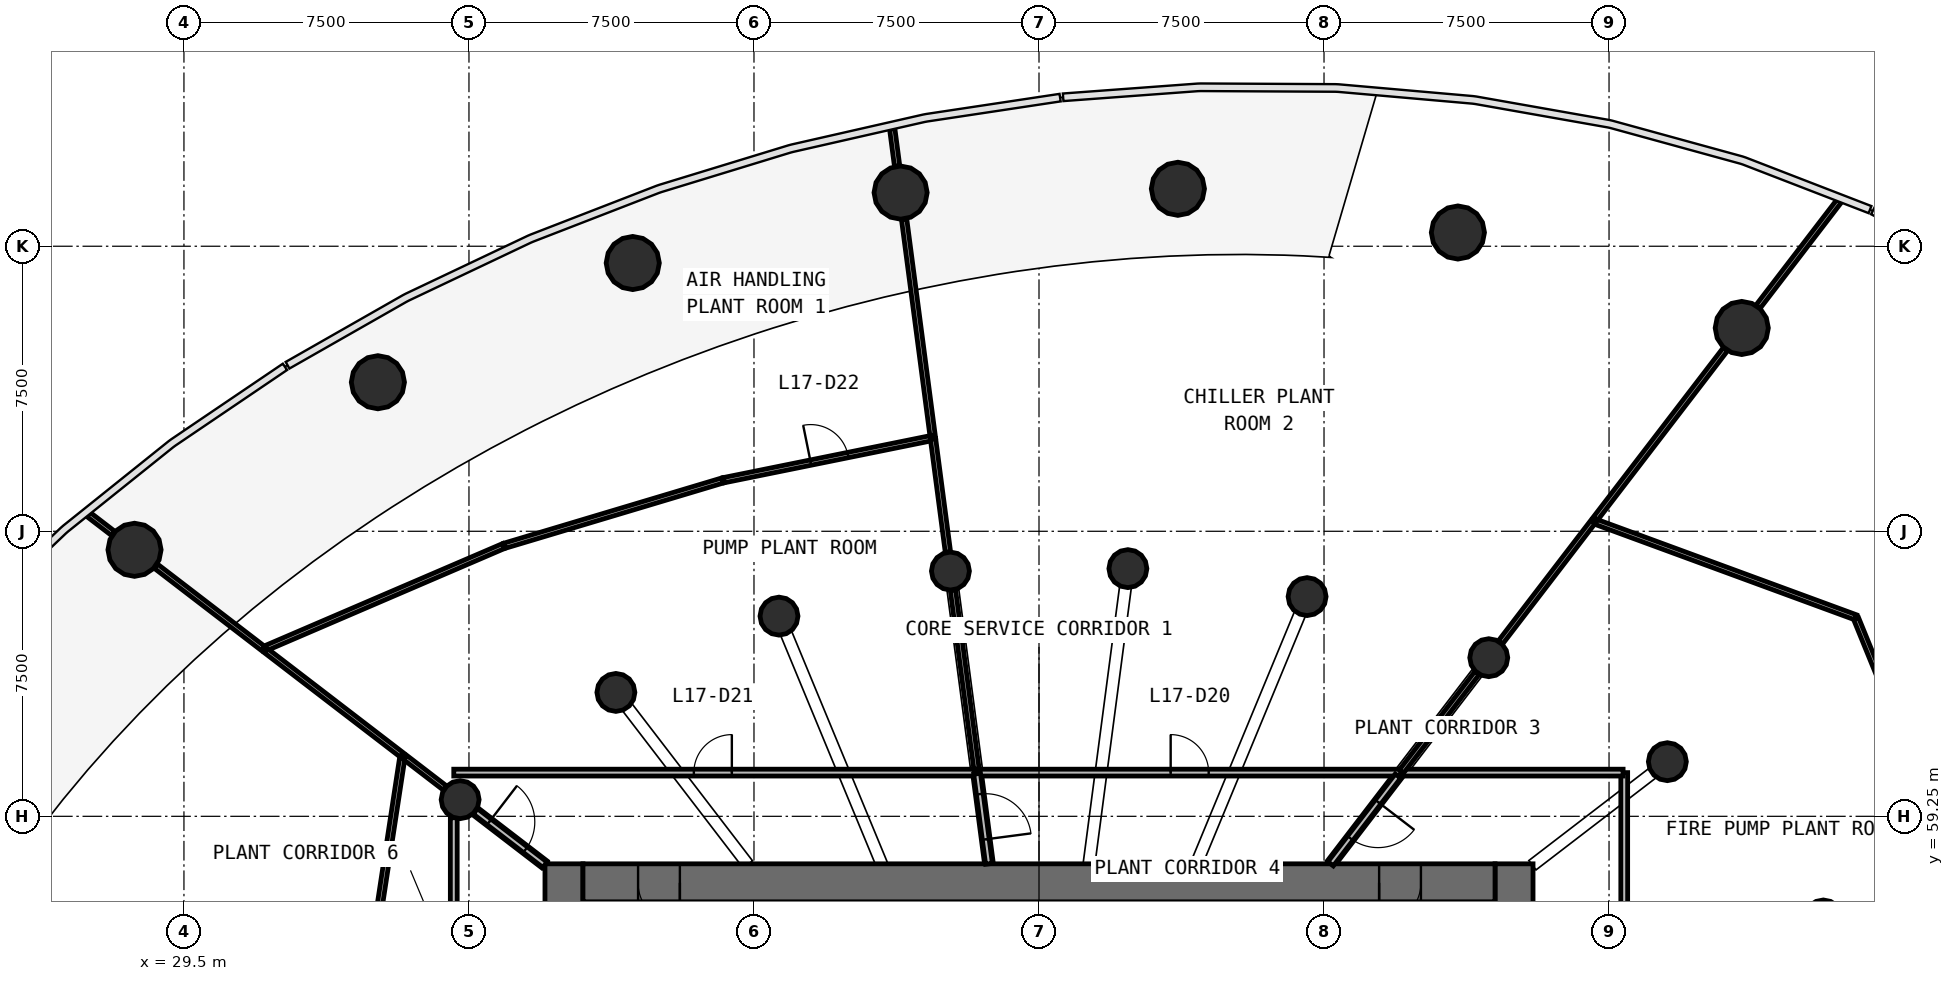
"""IFC4 building model, lengths in metres.
Left out: names, types, materials, properties, quantities, classifications, styles, units other than length and angle.
Written with IfcOpenShell. Run it as: python <this file> out.ifc"""

import sys

from ifc_helpers import new_model, si_unit, direction, frame, frame_2d, origin, origin_2d, place, context, subcontext, project, spatial, rectangle, circle, extrude, source, transform, mapped, element, fill, save


model = new_model("IFC4")
c1 = context("Model", 3, precision=1e-05, world=origin(), true_north=direction((0.0, 1.0)))
c2 = subcontext(c1, "Body", "Model", "MODEL_VIEW")
j1 = project(units=[si_unit("LENGTHUNIT", "METRE"), si_unit("PLANEANGLEUNIT", "RADIAN")], contexts=[c1])
p1 = place(None, origin())
s1 = spatial("IfcSite", under=j1, at=p1, CompositionType="ELEMENT")
p2 = place(p1, origin())
s2 = spatial("IfcBuilding", under=s1, at=p2, CompositionType="ELEMENT")
p3 = place(p2, frame((0.0, 0.0, 75.4)))
s3 = spatial("IfcBuildingStorey", under=s2, at=p3, CompositionType="ELEMENT", Elevation=75.4)
p4 = place(p3, frame((64.5, 38.0, 0.0), z_axis=(0.0, 0.0, 1.0), x_axis=(0.0, 1.0, 0.0)))
e1 = element("IfcWall", 1, at=p4, inside=s3, PredefinedType="SHEAR", context=c2, shape_type="SweptSolid", body=[
    extrude(rectangle(XDim=20.0, YDim=1.0, at=frame_2d((10.0, 0.0))), origin(), (0.0, 0.0, 1.0), 4.4),
])
p5 = place(p4, frame((9.1, 0.0, 0.0)))
e2 = element("IfcOpeningElement", 2, at=p5, cuts=e1, PredefinedType="OPENING", context=c2, shape_type="SweptSolid", body=[
    extrude(rectangle(XDim=1.8, YDim=2.1, at=frame_2d((0.9, 1.05))), frame((0.0, 0.51, 0.0), z_axis=(0.0, -1.0, 0.0), x_axis=(1.0, 0.0, 0.0)), (0.0, 0.0, 1.0), 1.02),
])
p6 = place(p3, frame((39.5, 58.0, 0.0), z_axis=(0.0, 0.0, 1.0), x_axis=(0.0, -1.0, 0.0)))
e3 = element("IfcWall", 3, at=p6, inside=s3, PredefinedType="SHEAR", context=c2, shape_type="SweptSolid", body=[
    extrude(rectangle(XDim=20.0, YDim=1.0, at=frame_2d((10.0, 0.0))), origin(), (0.0, 0.0, 1.0), 4.4),
])
p7 = place(p6, frame((9.1, 0.0, 0.0)))
e4 = element("IfcOpeningElement", 4, at=p7, cuts=e3, PredefinedType="OPENING", context=c2, shape_type="SweptSolid", body=[
    extrude(rectangle(XDim=1.8, YDim=2.1, at=frame_2d((0.9, 1.05))), frame((0.0, 0.51, 0.0), z_axis=(0.0, -1.0, 0.0), x_axis=(1.0, 0.0, 0.0)), (0.0, 0.0, 1.0), 1.02),
])
p8 = place(p3, frame((64.0, 57.5, 0.0), z_axis=(0.0, 0.0, 1.0), x_axis=(-1.0, 0.0, 0.0)))
e5 = element("IfcWall", 5, at=p8, inside=s3, PredefinedType="SHEAR", context=c2, shape_type="SweptSolid", body=[
    extrude(rectangle(XDim=24.0, YDim=1.0, at=frame_2d((12.0, 0.0))), origin(), (0.0, 0.0, 1.0), 4.4),
])
p9 = place(p8, frame((21.45, 0.0, 0.0)))
e6 = element("IfcOpeningElement", 6, at=p9, cuts=e5, PredefinedType="OPENING", context=c2, shape_type="SweptSolid", body=[
    extrude(rectangle(XDim=1.1, YDim=2.1, at=frame_2d((0.55, 1.05))), frame((0.0, 0.51, 0.0), z_axis=(0.0, -1.0, 0.0), x_axis=(1.0, 0.0, 0.0)), (0.0, 0.0, 1.0), 1.02),
])
p10 = place(p8, frame((1.95, 0.0, 0.0)))
e7 = element("IfcOpeningElement", 7, at=p10, cuts=e5, PredefinedType="OPENING", context=c2, shape_type="SweptSolid", body=[
    extrude(rectangle(XDim=1.1, YDim=2.1, at=frame_2d((0.55, 1.05))), frame((0.0, 0.51, 0.0), z_axis=(0.0, -1.0, 0.0), x_axis=(1.0, 0.0, 0.0)), (0.0, 0.0, 1.0), 1.02),
])
m1 = source(origin(), c2, "Body", "SweptSolid", [
    extrude(circle(Radius=0.7, at=origin_2d()), origin(), (0.0, 0.0, 1.0), 4.0),
])
for number, where, z_axis, x_axis in (
    (8, (70.492, 72.1, 0.0), (0.0, 0.0, 1.0), (1.0, 0.0, 0.0)),
    (9, (63.023, 74.611, 0.0), (0.0, 0.0, 1.0), (1.0, 0.0, 0.0)),
    (10, (55.655, 75.761, 0.0), (0.0, 0.0, 1.0), (1.0, 0.0, 0.0)),
    (11, (48.358, 75.661, 0.0), (0.0, 0.0, 1.0), (1.0, 0.0, 0.0)),
    (12, (41.31, 73.809, 0.0), (0.0, 0.0, 1.0), (1.0, 0.0, 0.0)),
    (13, (34.604, 70.672, 0.0), (0.0, 0.0, 1.0), (1.0, 0.0, 0.0)),
    (14, (28.199, 66.263, 0.0), (0.0, 0.0, 1.0), (1.0, 0.0, 0.0)),
):
    element("IfcColumn", number, at=place(p3, frame(where, z_axis=z_axis, x_axis=x_axis)), inside=s3, PredefinedType="COLUMN", context=c2, shape_type="MappedRepresentation", body=[
        mapped(m1, transform((0.0, 0.0, 0.0), scale=1.0)),
    ])
m2 = source(origin(), c2, "Body", "SweptSolid", [
    extrude(circle(Radius=0.5, at=origin_2d()), origin(), (0.0, 0.0, 1.0), 4.4),
])
for number, where, z_axis, x_axis in (
    (15, (72.639, 56.549, 0.0), (0.0, 0.0, 1.0), (1.0, 0.0, 0.0)),
    (16, (68.535, 60.688, 0.0), (0.0, 0.0, 1.0), (1.0, 0.0, 0.0)),
    (17, (63.835, 63.424, 0.0), (0.0, 0.0, 1.0), (1.0, 0.0, 0.0)),
    (18, (59.055, 65.031, 0.0), (0.0, 0.0, 1.0), (1.0, 0.0, 0.0)),
    (19, (54.339, 65.767, 0.0), (0.0, 0.0, 1.0), (1.0, 0.0, 0.0)),
    (20, (49.669, 65.703, 0.0), (0.0, 0.0, 1.0), (1.0, 0.0, 0.0)),
    (21, (45.158, 64.518, 0.0), (0.0, 0.0, 1.0), (1.0, 0.0, 0.0)),
    (22, (40.866, 62.51, 0.0), (0.0, 0.0, 1.0), (1.0, 0.0, 0.0)),
    (23, (36.768, 59.688, 0.0), (0.0, 0.0, 1.0), (1.0, 0.0, 0.0)),
):
    element("IfcColumn", number, at=place(p3, frame(where, z_axis=z_axis, x_axis=x_axis)), inside=s3, PredefinedType="COLUMN", context=c2, shape_type="MappedRepresentation", body=[
        mapped(m2, transform((0.0, 0.0, 0.0), scale=1.0)),
    ])
p11 = place(p3, frame((36.6, 60.4, 0.0), z_axis=(0.0, 0.0, 1.0), x_axis=(1.0, 0.0, 0.0)))
e24 = element("IfcWall", 24, at=p11, inside=s3, PredefinedType="PARTITIONING", context=c2, shape_type="SweptSolid", body=[
    extrude(rectangle(XDim=13.767, YDim=0.18, at=frame_2d((6.884, 0.0))), origin(), (0.0, 0.0, 1.0), 2.8),
])
p12 = place(p11, frame((6.317, 0.0, 0.0)))
e25 = element("IfcOpeningElement", 25, at=p12, cuts=e24, PredefinedType="OPENING", context=c2, shape_type="SweptSolid", body=[
    extrude(rectangle(XDim=1.0, YDim=2.1, at=frame_2d((0.5, 1.05))), frame((0.0, 0.1, 0.0), z_axis=(0.0, -1.0, 0.0), x_axis=(1.0, 0.0, 0.0)), (0.0, 0.0, 1.0), 0.2),
])
p13 = place(p3, frame((36.6, 45.973, 0.0), z_axis=(0.0, 0.0, 1.0), x_axis=(0.0, 1.0, 0.0)))
e26 = element("IfcWall", 26, at=p13, inside=s3, PredefinedType="PARTITIONING", context=c2, shape_type="SweptSolid", body=[
    extrude(rectangle(XDim=13.24, YDim=0.18, at=frame_2d((6.62, 0.0))), origin(), (0.0, 0.0, 1.0), 2.8),
])
p14 = place(p13, frame((6.19, 0.0, 0.0)))
e27 = element("IfcOpeningElement", 27, at=p14, cuts=e26, PredefinedType="OPENING", context=c2, shape_type="SweptSolid", body=[
    extrude(rectangle(XDim=1.0, YDim=2.1, at=frame_2d((0.5, 1.05))), frame((0.0, 0.1, 0.0), z_axis=(0.0, -1.0, 0.0), x_axis=(1.0, 0.0, 0.0)), (0.0, 0.0, 1.0), 0.2),
])
p15 = place(p3, frame((50.397, 60.4, 0.0), z_axis=(0.0, 0.0, 1.0), x_axis=(1.0, 0.0, 0.0)))
e28 = element("IfcWall", 28, at=p15, inside=s3, PredefinedType="PARTITIONING", context=c2, shape_type="SweptSolid", body=[
    extrude(rectangle(XDim=11.117, YDim=0.18, at=frame_2d((5.559, 0.0))), origin(), (0.0, 0.0, 1.0), 2.8),
])
p16 = place(p15, frame((5.067, 0.0, 0.0)))
e29 = element("IfcOpeningElement", 29, at=p16, cuts=e28, PredefinedType="OPENING", context=c2, shape_type="SweptSolid", body=[
    extrude(rectangle(XDim=1.0, YDim=2.1, at=frame_2d((0.5, 1.05))), frame((0.0, 0.1, 0.0), z_axis=(0.0, -1.0, 0.0), x_axis=(1.0, 0.0, 0.0)), (0.0, 0.0, 1.0), 0.2),
])
p17 = place(p3, frame((67.4, 60.4, 0.0), z_axis=(0.0, 0.0, 1.0), x_axis=(0.0, -1.0, 0.0)))
e30 = element("IfcWall", 30, at=p17, inside=s3, PredefinedType="PARTITIONING", context=c2, shape_type="SweptSolid", body=[
    extrude(rectangle(XDim=10.343, YDim=0.18, at=frame_2d((5.171, 0.0))), origin(), (0.0, 0.0, 1.0), 2.8),
])
p18 = place(p17, frame((4.693, 0.0, 0.0)))
e31 = element("IfcOpeningElement", 31, at=p18, cuts=e30, PredefinedType="OPENING", context=c2, shape_type="SweptSolid", body=[
    extrude(rectangle(XDim=1.0, YDim=2.1, at=frame_2d((0.5, 1.05))), frame((0.0, 0.1, 0.0), z_axis=(0.0, -1.0, 0.0), x_axis=(1.0, 0.0, 0.0)), (0.0, 0.0, 1.0), 0.2),
])
p19 = place(p3, frame((67.37, 60.4, 0.0), z_axis=(0.0, 0.0, 1.0), x_axis=(-1.0, 0.0, 0.0)))
e32 = element("IfcWall", 32, at=p19, inside=s3, PredefinedType="PARTITIONING", context=c2, shape_type="SweptSolid", body=[
    extrude(rectangle(XDim=5.825, YDim=0.18, at=frame_2d((2.913, 0.0))), origin(), (0.0, 0.0, 1.0), 2.8),
])
p20 = place(p3, frame((61.446, 60.31, 0.0), z_axis=(0.0, 0.0, 1.0), x_axis=(-0.608737787706, -0.793371480341, 0.0)))
e33 = element("IfcWall", 33, at=p20, inside=s3, PredefinedType="PARTITIONING", context=c2, shape_type="SweptSolid", body=[
    extrude(rectangle(XDim=2.912, YDim=0.18, at=frame_2d((1.456, 0.0))), origin(), (0.0, 0.0, 1.0), 2.8),
])
p21 = place(p20, frame((0.862, 0.0, 0.0)))
e34 = element("IfcOpeningElement", 34, at=p21, cuts=e33, PredefinedType="OPENING", context=c2, shape_type="SweptSolid", body=[
    extrude(rectangle(XDim=1.2, YDim=2.1, at=frame_2d((0.6, 1.05))), frame((0.0, 0.1, 0.0), z_axis=(0.0, -1.0, 0.0), x_axis=(1.0, 0.0, 0.0)), (0.0, 0.0, 1.0), 0.2),
])
p22 = place(p3, frame((50.371, 60.37, 0.0), z_axis=(0.0, 0.0, 1.0), x_axis=(0.13060507681, -0.991434472828, 0.0)))
e35 = element("IfcWall", 35, at=p22, inside=s3, PredefinedType="PARTITIONING", context=c2, shape_type="SweptSolid", body=[
    extrude(rectangle(XDim=2.391, YDim=0.18, at=frame_2d((1.195, 0.0))), origin(), (0.0, 0.0, 1.0), 2.8),
])
p23 = place(p22, frame((0.541, 0.0, 0.0)))
e36 = element("IfcOpeningElement", 36, at=p23, cuts=e35, PredefinedType="OPENING", context=c2, shape_type="SweptSolid", body=[
    extrude(rectangle(XDim=1.2, YDim=2.1, at=frame_2d((0.6, 1.05))), frame((0.0, 0.1, 0.0), z_axis=(0.0, -1.0, 0.0), x_axis=(1.0, 0.0, 0.0)), (0.0, 0.0, 1.0), 0.2),
])
p24 = place(p3, frame((37.168, 59.381, 0.0), z_axis=(0.0, 0.0, 1.0), x_axis=(0.793393624489, -0.608708926023, 0.0)))
e37 = element("IfcWall", 37, at=p24, inside=s3, PredefinedType="PARTITIONING", context=c2, shape_type="SweptSolid", body=[
    extrude(rectangle(XDim=2.309, YDim=0.18, at=frame_2d((1.155, 0.0))), origin(), (0.0, 0.0, 1.0), 2.8),
])
p25 = place(p24, frame((0.459, 0.0, 0.0)))
e38 = element("IfcOpeningElement", 38, at=p25, cuts=e37, PredefinedType="OPENING", context=c2, shape_type="SweptSolid", body=[
    extrude(rectangle(XDim=1.2, YDim=2.1, at=frame_2d((0.6, 1.05))), frame((0.0, 0.1, 0.0), z_axis=(0.0, -1.0, 0.0), x_axis=(1.0, 0.0, 0.0)), (0.0, 0.0, 1.0), 0.2),
])
p26 = place(p3, frame((73.487, 64.487, 0.0), z_axis=(0.0, 0.0, 1.0), x_axis=(-0.938632857677, 0.344917901085, 0.0)))
e39 = element("IfcWall", 39, at=p26, inside=s3, PredefinedType="PARTITIONING", context=c2, shape_type="SweptSolid", body=[
    extrude(rectangle(XDim=7.343, YDim=0.14, at=frame_2d((3.671, 0.0))), origin(), (0.0, 0.0, 1.0), 2.8),
])
p27 = place(p3, frame((76.136, 57.998, 0.0), z_axis=(0.0, 0.0, 1.0), x_axis=(-0.377966751533, 0.925819169566, 0.0)))
e40 = element("IfcWall", 40, at=p27, inside=s3, PredefinedType="PARTITIONING", context=c2, shape_type="SweptSolid", body=[
    extrude(rectangle(XDim=6.98, YDim=0.14, at=frame_2d((3.49, 0.0))), origin(), (0.0, 0.0, 1.0), 2.8),
])
p28 = place(p3, frame((37.911, 66.362, 0.0), z_axis=(0.0, 0.0, 1.0), x_axis=(-0.918844976154, -0.394618689112, 0.0)))
e41 = element("IfcWall", 41, at=p28, inside=s3, PredefinedType="PARTITIONING", context=c2, shape_type="SweptSolid", body=[
    extrude(rectangle(XDim=6.866, YDim=0.14, at=frame_2d((3.433, 0.0))), origin(), (0.0, 0.0, 1.0), 2.8),
])
p29 = place(p3, frame((43.679, 68.089, 0.0), z_axis=(0.0, 0.0, 1.0), x_axis=(-0.957979800039, -0.286835671976, 0.0)))
e42 = element("IfcWall", 42, at=p29, inside=s3, PredefinedType="PARTITIONING", context=c2, shape_type="SweptSolid", body=[
    extrude(rectangle(XDim=5.991, YDim=0.14, at=frame_2d((2.996, 0.0))), origin(), (0.0, 0.0, 1.0), 2.8),
])
p30 = place(p3, frame((49.208, 69.209, 0.0), z_axis=(0.0, 0.0, 1.0), x_axis=(-0.130524150985, 0.991445130105, 0.0)))
e43 = element("IfcWall", 43, at=p30, inside=s3, PredefinedType="PARTITIONING", context=c2, shape_type="SweptSolid", body=[
    extrude(rectangle(XDim=5.804, YDim=0.14, at=frame_2d((2.902, 0.0))), origin(), (0.0, 0.0, 1.0), 2.8),
])
p31 = place(p3, frame((66.639, 67.078, 0.0), z_axis=(0.0, 0.0, 1.0), x_axis=(0.608768603858, 0.793347834784, 0.0)))
e44 = element("IfcWall", 44, at=p31, inside=s3, PredefinedType="PARTITIONING", context=c2, shape_type="SweptSolid", body=[
    extrude(rectangle(XDim=5.625, YDim=0.14, at=frame_2d((2.813, 0.0))), origin(), (0.0, 0.0, 1.0), 2.8),
])
p32 = place(p3, frame((43.708, 68.095, 0.0), z_axis=(0.0, 0.0, 1.0), x_axis=(0.980089724436, 0.198555110878, 0.0)))
e45 = element("IfcWall", 45, at=p32, inside=s3, PredefinedType="PARTITIONING", context=c2, shape_type="SweptSolid", body=[
    extrude(rectangle(XDim=5.581, YDim=0.14, at=frame_2d((2.791, 0.0))), origin(), (0.0, 0.0, 1.0), 2.8),
])
p33 = place(p32, frame((2.331, 0.0, 0.0)))
e46 = element("IfcOpeningElement", 46, at=p33, cuts=e45, PredefinedType="OPENING", context=c2, shape_type="SweptSolid", body=[
    extrude(rectangle(XDim=1.0, YDim=2.1, at=frame_2d((0.5, 1.05))), frame((0.0, 0.08, 0.0), z_axis=(0.0, -1.0, 0.0), x_axis=(1.0, 0.0, 0.0)), (0.0, 0.0, 1.0), 0.16),
])
p34 = place(p3, frame((35.254, 60.849, 0.0), z_axis=(0.0, 0.0, 1.0), x_axis=(-0.150752706643, -0.988571505476, 0.0)))
e47 = element("IfcWall", 47, at=p34, inside=s3, PredefinedType="PARTITIONING", context=c2, shape_type="SweptSolid", body=[
    extrude(rectangle(XDim=5.626, YDim=0.14, at=frame_2d((2.813, 0.0))), origin(), (0.0, 0.0, 1.0), 2.8),
])
p35 = place(p3, frame((50.356, 60.49, 0.0), z_axis=(0.0, 0.0, 1.0), x_axis=(-0.130548834981, 0.991441880135, 0.0)))
e48 = element("IfcWall", 48, at=p35, inside=s3, PredefinedType="PARTITIONING", context=c2, shape_type="SweptSolid", body=[
    extrude(rectangle(XDim=4.754, YDim=0.14, at=frame_2d((2.377, 0.0))), origin(), (0.0, 0.0, 1.0), 2.8),
])
p36 = place(p3, frame((35.231, 60.868, 0.0), z_axis=(0.0, 0.0, 1.0), x_axis=(-0.79336058226, 0.608751990976, 0.0)))
e49 = element("IfcWall", 49, at=p36, inside=s3, PredefinedType="PARTITIONING", context=c2, shape_type="SweptSolid", body=[
    extrude(rectangle(XDim=4.494, YDim=0.14, at=frame_2d((2.247, 0.0))), origin(), (0.0, 0.0, 1.0), 2.8),
])
p37 = place(p3, frame((64.142, 63.824, 0.0), z_axis=(0.0, 0.0, 1.0), x_axis=(0.608766057901, 0.793349788396, 0.0)))
e50 = element("IfcWall", 50, at=p37, inside=s3, PredefinedType="PARTITIONING", context=c2, shape_type="SweptSolid", body=[
    extrude(rectangle(XDim=3.998, YDim=0.14, at=frame_2d((1.999, 0.0))), origin(), (0.0, 0.0, 1.0), 2.8),
])
p38 = place(p3, frame((31.578, 63.67, 0.0), z_axis=(0.0, 0.0, 1.0), x_axis=(-0.793366411032, 0.608744394509, 0.0)))
e51 = element("IfcWall", 51, at=p38, inside=s3, PredefinedType="PARTITIONING", context=c2, shape_type="SweptSolid", body=[
    extrude(rectangle(XDim=3.554, YDim=0.14, at=frame_2d((1.777, 0.0))), origin(), (0.0, 0.0, 1.0), 2.8),
])
p39 = place(p3, frame((70.921, 72.658, 0.0), z_axis=(0.0, 0.0, 1.0), x_axis=(0.608803527611, 0.793321035123, 0.0)))
e52 = element("IfcWall", 52, at=p39, inside=s3, PredefinedType="PARTITIONING", context=c2, shape_type="SweptSolid", body=[
    extrude(rectangle(XDim=3.513, YDim=0.14, at=frame_2d((1.756, 0.0))), origin(), (0.0, 0.0, 1.0), 3.1),
])
p40 = place(p3, frame((61.537, 60.429, 0.0), z_axis=(0.0, 0.0, 1.0), x_axis=(0.608754323654, 0.793358792371, 0.0)))
e53 = element("IfcWall", 53, at=p40, inside=s3, PredefinedType="PARTITIONING", context=c2, shape_type="SweptSolid", body=[
    extrude(rectangle(XDim=3.271, YDim=0.14, at=frame_2d((1.635, 0.0))), origin(), (0.0, 0.0, 1.0), 2.8),
])
p41 = place(p3, frame((49.604, 66.203, 0.0), z_axis=(0.0, 0.0, 1.0), x_axis=(-0.13055972401, 0.991440446253, 0.0)))
e54 = element("IfcWall", 54, at=p41, inside=s3, PredefinedType="PARTITIONING", context=c2, shape_type="SweptSolid", body=[
    extrude(rectangle(XDim=3.001, YDim=0.14, at=frame_2d((1.5, 0.0))), origin(), (0.0, 0.0, 1.0), 2.8),
])
p42 = place(p3, frame((36.367, 59.995, 0.0), z_axis=(0.0, 0.0, 1.0), x_axis=(-0.793330053211, 0.608791776121, 0.0)))
e55 = element("IfcWall", 55, at=p42, inside=s3, PredefinedType="PARTITIONING", context=c2, shape_type="SweptSolid", body=[
    extrude(rectangle(XDim=1.323, YDim=0.14, at=frame_2d((0.662, 0.0))), origin(), (0.0, 0.0, 1.0), 2.8),
])
p43 = place(p3, frame((48.266, 76.36, 0.0), z_axis=(0.0, 0.0, 1.0), x_axis=(-0.13062697631, 0.991431587685, 0.0)))
e56 = element("IfcWall", 56, at=p43, inside=s3, PredefinedType="PARTITIONING", context=c2, shape_type="SweptSolid", body=[
    extrude(rectangle(XDim=0.989, YDim=0.14, at=frame_2d((0.494, 0.0))), origin(), (0.0, 0.0, 1.0), 3.1),
])
p44 = place(p3, frame((27.641, 66.691, 0.0), z_axis=(0.0, 0.0, 1.0), x_axis=(-0.793252635304, 0.608892647832, 0.0)))
e57 = element("IfcWall", 57, at=p44, inside=s3, PredefinedType="PARTITIONING", context=c2, shape_type="SweptSolid", body=[
    extrude(rectangle(XDim=0.822, YDim=0.14, at=frame_2d((0.411, 0.0))), origin(), (0.0, 0.0, 1.0), 3.1),
])
m3 = source(origin(), c2, "Body", "SweptSolid", [
    extrude(rectangle(XDim=1.1, YDim=2.1, at=frame_2d((0.55, 1.05))), frame((0.0, 0.025, 0.0), z_axis=(0.0, -1.0, 0.0), x_axis=(1.0, 0.0, 0.0)), (0.0, 0.0, 1.0), 0.05),
])
p45 = place(p9, origin())
e58 = element("IfcDoor", 58, at=p45, inside=s3, OperationType="SINGLE_SWING_LEFT", PredefinedType="DOOR", context=c2, shape_type="MappedRepresentation", body=[
    mapped(m3, transform((0.0, 0.0, 0.0), scale=1.0)),
])
fill(e6, e58)
p46 = place(p10, origin())
e59 = element("IfcDoor", 59, at=p46, inside=s3, OperationType="SINGLE_SWING_RIGHT", PredefinedType="DOOR", context=c2, shape_type="MappedRepresentation", body=[
    mapped(m3, transform((0.0, 0.0, 0.0), scale=1.0)),
])
fill(e7, e59)
m4 = source(origin(), c2, "Body", "SweptSolid", [
    extrude(rectangle(XDim=1.0, YDim=2.1, at=frame_2d((0.5, 1.05))), frame((0.0, 0.025, 0.0), z_axis=(0.0, -1.0, 0.0), x_axis=(1.0, 0.0, 0.0)), (0.0, 0.0, 1.0), 0.05),
])
p47 = place(p16, origin())
e60 = element("IfcDoor", 60, at=p47, inside=s3, OperationType="SINGLE_SWING_LEFT", PredefinedType="DOOR", context=c2, shape_type="MappedRepresentation", body=[
    mapped(m4, transform((0.0, 0.0, 0.0), scale=1.0)),
])
fill(e29, e60)
p48 = place(p12, origin())
e61 = element("IfcDoor", 61, at=p48, inside=s3, OperationType="SINGLE_SWING_RIGHT", PredefinedType="DOOR", context=c2, shape_type="MappedRepresentation", body=[
    mapped(m4, transform((0.0, 0.0, 0.0), scale=1.0)),
])
fill(e25, e61)
p49 = place(p33, origin())
e62 = element("IfcDoor", 62, at=p49, inside=s3, OperationType="SINGLE_SWING_LEFT", PredefinedType="DOOR", context=c2, shape_type="MappedRepresentation", body=[
    mapped(m4, transform((0.0, 0.0, 0.0), scale=1.0)),
])
fill(e46, e62)
m5 = source(origin(), c2, "Body", "SweptSolid", [
    extrude(rectangle(XDim=1.2, YDim=2.1, at=frame_2d((0.6, 1.05))), frame((0.0, 0.025, 0.0), z_axis=(0.0, -1.0, 0.0), x_axis=(1.0, 0.0, 0.0)), (0.0, 0.0, 1.0), 0.05),
])
p50 = place(p21, origin())
e63 = element("IfcDoor", 63, at=p50, inside=s3, OperationType="SINGLE_SWING_LEFT", PredefinedType="DOOR", context=c2, shape_type="MappedRepresentation", body=[
    mapped(m5, transform((0.0, 0.0, 0.0), scale=1.0)),
])
fill(e34, e63)
p51 = place(p23, origin())
e64 = element("IfcDoor", 64, at=p51, inside=s3, OperationType="SINGLE_SWING_RIGHT", PredefinedType="DOOR", context=c2, shape_type="MappedRepresentation", body=[
    mapped(m5, transform((0.0, 0.0, 0.0), scale=1.0)),
])
fill(e36, e64)
p52 = place(p25, origin())
e65 = element("IfcDoor", 65, at=p52, inside=s3, OperationType="SINGLE_SWING_LEFT", PredefinedType="DOOR", context=c2, shape_type="MappedRepresentation", body=[
    mapped(m5, transform((0.0, 0.0, 0.0), scale=1.0)),
])
fill(e38, e65)
save(model, sys.argv[1])
